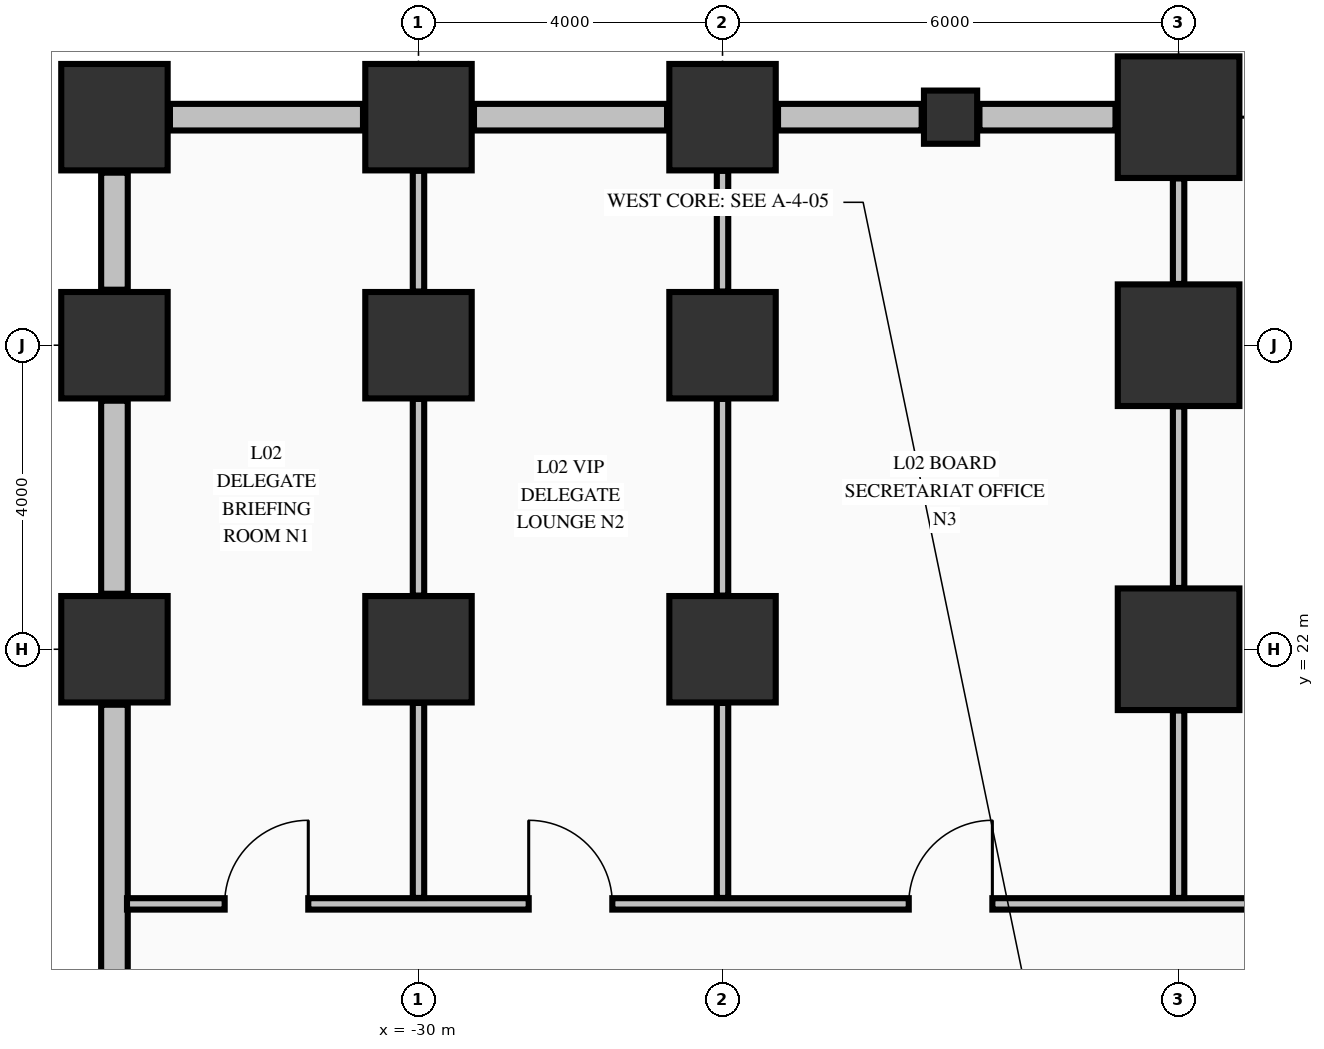
"""IFC4 building model, lengths in metres.
Left out: names, types, materials, properties, quantities, classifications, styles, units other than length and angle.
Written with IfcOpenShell. Run it as: python <this file> out.ifc"""

import sys

from ifc_helpers import new_model, si_unit, direction, frame, frame_2d, origin, origin_2d, place, context, subcontext, project, spatial, rectangle, extrude, element, fill, save


model = new_model("IFC4")
c1 = context("Model", 3, precision=1e-05, world=origin(), true_north=direction((0.0, 1.0)))
c2 = subcontext(c1, "Body", "Model", "MODEL_VIEW")
j1 = project(units=[si_unit("LENGTHUNIT", "METRE"), si_unit("PLANEANGLEUNIT", "RADIAN")], contexts=[c1])
p1 = place(None, origin())
s1 = spatial("IfcSite", under=j1, at=p1, CompositionType="ELEMENT")
p2 = place(p1, origin())
s2 = spatial("IfcBuilding", under=s1, at=p2, CompositionType="ELEMENT")
p3 = place(p2, frame((0.0, 0.0, 10.88)))
s3 = spatial("IfcBuildingStorey", under=s2, at=p3, CompositionType="ELEMENT", Elevation=10.88)
for number, where, z_axis, x_axis in (
    (1, (-34.0, 22.0, 0.0), (0.0, 0.0, 1.0), (1.0, 0.0, 0.0)),
    (2, (-34.0, 26.0, 0.0), (0.0, 0.0, 1.0), (1.0, 0.0, 0.0)),
    (3, (-34.0, 29.0, 0.0), (0.0, 0.0, 1.0), (1.0, 0.0, 0.0)),
    (4, (-30.0, 22.0, 0.0), (0.0, 0.0, 1.0), (1.0, 0.0, 0.0)),
    (5, (-30.0, 26.0, 0.0), (0.0, 0.0, 1.0), (1.0, 0.0, 0.0)),
    (6, (-30.0, 29.0, 0.0), (0.0, 0.0, 1.0), (1.0, 0.0, 0.0)),
    (7, (-26.0, 22.0, 0.0), (0.0, 0.0, 1.0), (1.0, 0.0, 0.0)),
    (8, (-26.0, 26.0, 0.0), (0.0, 0.0, 1.0), (1.0, 0.0, 0.0)),
    (9, (-26.0, 29.0, 0.0), (0.0, 0.0, 1.0), (1.0, 0.0, 0.0)),
):
    element("IfcColumn", number, at=place(p3, frame(where, z_axis=z_axis, x_axis=x_axis)), inside=s3, PredefinedType="COLUMN", context=c2, shape_type="SweptSolid", body=[
        extrude(rectangle(XDim=1.4, YDim=1.4, at=origin_2d()), origin(), (0.0, 0.0, 1.0), 5.09),
    ])
for number, where, z_axis, x_axis in (
    (10, (-20.0, 22.0, 0.0), (0.0, 0.0, 1.0), (1.0, 0.0, 0.0)),
    (11, (-20.0, 26.0, 0.0), (0.0, 0.0, 1.0), (1.0, 0.0, 0.0)),
    (12, (-20.0, 29.0, 0.0), (0.0, 0.0, 1.0), (1.0, 0.0, 0.0)),
):
    element("IfcColumn", number, at=place(p3, frame(where, z_axis=z_axis, x_axis=x_axis)), inside=s3, PredefinedType="COLUMN", context=c2, shape_type="SweptSolid", body=[
        extrude(rectangle(XDim=1.6, YDim=1.6, at=origin_2d()), origin(), (0.0, 0.0, 1.0), 5.09),
    ])
p4 = place(p3, frame((-23.0, 29.0, 0.0), z_axis=(0.0, 0.0, 1.0), x_axis=(1.0, 0.0, 0.0)))
e13 = element("IfcColumn", 13, at=p4, inside=s3, PredefinedType="PILASTER", context=c2, shape_type="SweptSolid", body=[
    extrude(rectangle(XDim=0.7, YDim=0.7, at=origin_2d()), origin(), (0.0, 0.0, 1.0), 5.09),
])
for number, where, z_axis, x_axis in (
    (14, (-30.73, 29.0, 0.0), (0.0, 0.0, 1.0), (-1.0, 0.0, 0.0)),
    (15, (-26.73, 29.0, 0.0), (0.0, 0.0, 1.0), (-1.0, 0.0, 0.0)),
):
    element("IfcWall", number, at=place(p3, frame(where, z_axis=z_axis, x_axis=x_axis)), inside=s3, PredefinedType="STANDARD", context=c2, shape_type="SweptSolid", body=[
        extrude(rectangle(XDim=2.54, YDim=0.35, at=frame_2d((1.27, 0.0))), origin(), (0.0, 0.0, 1.0), 4.482),
    ])
p5 = place(p3, frame((-23.38, 29.0, 0.0), z_axis=(0.0, 0.0, 1.0), x_axis=(-1.0, 0.0, 0.0)))
e16 = element("IfcWall", 16, at=p5, inside=s3, PredefinedType="STANDARD", context=c2, shape_type="SweptSolid", body=[
    extrude(rectangle(XDim=1.89, YDim=0.35, at=frame_2d((0.945, 0.0))), origin(), (0.0, 0.0, 1.0), 4.482),
])
p6 = place(p3, frame((-20.83, 29.0, 0.0), z_axis=(0.0, 0.0, 1.0), x_axis=(-1.0, 0.0, 0.0)))
e17 = element("IfcWall", 17, at=p6, inside=s3, PredefinedType="STANDARD", context=c2, shape_type="SweptSolid", body=[
    extrude(rectangle(XDim=1.79, YDim=0.35, at=frame_2d((0.895, 0.0))), origin(), (0.0, 0.0, 1.0), 4.482),
])
p7 = place(p3, frame((-34.0, 16.73, 0.0), z_axis=(0.0, 0.0, 1.0), x_axis=(0.0, 1.0, 0.0)))
e18 = element("IfcWall", 18, at=p7, inside=s3, PredefinedType="STANDARD", context=c2, shape_type="SweptSolid", body=[
    extrude(rectangle(XDim=4.54, YDim=0.35, at=frame_2d((2.27, 0.0))), origin(), (0.0, 0.0, 1.0), 4.482),
])
p8 = place(p3, frame((-34.0, 22.73, 0.0), z_axis=(0.0, 0.0, 1.0), x_axis=(0.0, 1.0, 0.0)))
e19 = element("IfcWall", 19, at=p8, inside=s3, PredefinedType="STANDARD", context=c2, shape_type="SweptSolid", body=[
    extrude(rectangle(XDim=2.54, YDim=0.35, at=frame_2d((1.27, 0.0))), origin(), (0.0, 0.0, 1.0), 4.482),
])
p9 = place(p3, frame((-34.0, 26.73, 0.0), z_axis=(0.0, 0.0, 1.0), x_axis=(0.0, 1.0, 0.0)))
e20 = element("IfcWall", 20, at=p9, inside=s3, PredefinedType="STANDARD", context=c2, shape_type="SweptSolid", body=[
    extrude(rectangle(XDim=1.54, YDim=0.35, at=frame_2d((0.77, 0.0))), origin(), (0.0, 0.0, 1.0), 4.482),
])
p10 = place(p3, frame((-33.835, 18.65, 0.0), z_axis=(0.0, 0.0, 1.0), x_axis=(1.0, 0.0, 0.0)))
e21 = element("IfcWall", 21, at=p10, inside=s3, PredefinedType="PARTITIONING", context=c2, shape_type="SweptSolid", body=[
    extrude(rectangle(XDim=63.685, YDim=0.15, at=frame_2d((31.843, 0.0))), origin(), (0.0, 0.0, 1.0), 5.09),
])
p11 = place(p10, frame((1.285, 0.0, 0.0)))
e22 = element("IfcOpeningElement", 22, at=p11, cuts=e21, PredefinedType="OPENING", context=c2, shape_type="SweptSolid", body=[
    extrude(rectangle(XDim=1.1, YDim=2.15, at=frame_2d((0.55, 1.075))), frame((0.0, 0.085, 0.0), z_axis=(0.0, -1.0, 0.0), x_axis=(1.0, 0.0, 0.0)), (0.0, 0.0, 1.0), 0.17),
])
p12 = place(p10, frame((5.285, 0.0, 0.0)))
e23 = element("IfcOpeningElement", 23, at=p12, cuts=e21, PredefinedType="OPENING", context=c2, shape_type="SweptSolid", body=[
    extrude(rectangle(XDim=1.1, YDim=2.15, at=frame_2d((0.55, 1.075))), frame((0.0, 0.085, 0.0), z_axis=(0.0, -1.0, 0.0), x_axis=(1.0, 0.0, 0.0)), (0.0, 0.0, 1.0), 0.17),
])
p13 = place(p10, frame((10.285, 0.0, 0.0)))
e24 = element("IfcOpeningElement", 24, at=p13, cuts=e21, PredefinedType="OPENING", context=c2, shape_type="SweptSolid", body=[
    extrude(rectangle(XDim=1.1, YDim=2.15, at=frame_2d((0.55, 1.075))), frame((0.0, 0.085, 0.0), z_axis=(0.0, -1.0, 0.0), x_axis=(1.0, 0.0, 0.0)), (0.0, 0.0, 1.0), 0.17),
])
p14 = place(p10, frame((15.535, 0.0, 0.0)))
e25 = element("IfcOpeningElement", 25, at=p14, cuts=e21, PredefinedType="OPENING", context=c2, shape_type="SweptSolid", body=[
    extrude(rectangle(XDim=1.1, YDim=2.15, at=frame_2d((0.55, 1.075))), frame((0.0, 0.085, 0.0), z_axis=(0.0, -1.0, 0.0), x_axis=(1.0, 0.0, 0.0)), (0.0, 0.0, 1.0), 0.17),
])
p15 = place(p10, frame((20.035, 0.0, 0.0)))
e26 = element("IfcOpeningElement", 26, at=p15, cuts=e21, PredefinedType="OPENING", context=c2, shape_type="SweptSolid", body=[
    extrude(rectangle(XDim=1.1, YDim=2.15, at=frame_2d((0.55, 1.075))), frame((0.0, 0.085, 0.0), z_axis=(0.0, -1.0, 0.0), x_axis=(1.0, 0.0, 0.0)), (0.0, 0.0, 1.0), 0.17),
])
p16 = place(p10, frame((23.56, 0.0, 0.0)))
e27 = element("IfcOpeningElement", 27, at=p16, cuts=e21, PredefinedType="OPENING", context=c2, shape_type="SweptSolid", body=[
    extrude(rectangle(XDim=0.95, YDim=2.15, at=frame_2d((0.475, 1.075))), frame((0.0, 0.085, 0.0), z_axis=(0.0, -1.0, 0.0), x_axis=(1.0, 0.0, 0.0)), (0.0, 0.0, 1.0), 0.17),
])
p17 = place(p10, frame((28.985, 0.0, 0.0)))
e28 = element("IfcOpeningElement", 28, at=p17, cuts=e21, PredefinedType="OPENING", context=c2, shape_type="SweptSolid", body=[
    extrude(rectangle(XDim=1.1, YDim=2.15, at=frame_2d((0.55, 1.075))), frame((0.0, 0.085, 0.0), z_axis=(0.0, -1.0, 0.0), x_axis=(1.0, 0.0, 0.0)), (0.0, 0.0, 1.0), 0.17),
])
p18 = place(p10, frame((37.585, 0.0, 0.0)))
e29 = element("IfcOpeningElement", 29, at=p18, cuts=e21, PredefinedType="OPENING", context=c2, shape_type="SweptSolid", body=[
    extrude(rectangle(XDim=1.1, YDim=2.15, at=frame_2d((0.55, 1.075))), frame((0.0, 0.085, 0.0), z_axis=(0.0, -1.0, 0.0), x_axis=(1.0, 0.0, 0.0)), (0.0, 0.0, 1.0), 0.17),
])
p19 = place(p10, frame((43.16, 0.0, 0.0)))
e30 = element("IfcOpeningElement", 30, at=p19, cuts=e21, PredefinedType="OPENING", context=c2, shape_type="SweptSolid", body=[
    extrude(rectangle(XDim=0.95, YDim=2.15, at=frame_2d((0.475, 1.075))), frame((0.0, 0.085, 0.0), z_axis=(0.0, -1.0, 0.0), x_axis=(1.0, 0.0, 0.0)), (0.0, 0.0, 1.0), 0.17),
])
p20 = place(p10, frame((61.31, 0.0, 0.0)))
e31 = element("IfcOpeningElement", 31, at=p20, cuts=e21, PredefinedType="OPENING", context=c2, shape_type="SweptSolid", body=[
    extrude(rectangle(XDim=0.95, YDim=2.15, at=frame_2d((0.475, 1.075))), frame((0.0, 0.085, 0.0), z_axis=(0.0, -1.0, 0.0), x_axis=(1.0, 0.0, 0.0)), (0.0, 0.0, 1.0), 0.17),
])
p21 = place(p10, frame((47.56, 0.0, 0.0)))
e32 = element("IfcOpeningElement", 32, at=p21, cuts=e21, PredefinedType="OPENING", context=c2, shape_type="SweptSolid", body=[
    extrude(rectangle(XDim=0.95, YDim=2.15, at=frame_2d((0.475, 1.075))), frame((0.0, 0.085, 0.0), z_axis=(0.0, -1.0, 0.0), x_axis=(1.0, 0.0, 0.0)), (0.0, 0.0, 1.0), 0.17),
])
p22 = place(p10, frame((51.31, 0.0, 0.0)))
e33 = element("IfcOpeningElement", 33, at=p22, cuts=e21, PredefinedType="OPENING", context=c2, shape_type="SweptSolid", body=[
    extrude(rectangle(XDim=1.05, YDim=2.15, at=frame_2d((0.525, 1.075))), frame((0.0, 0.085, 0.0), z_axis=(0.0, -1.0, 0.0), x_axis=(1.0, 0.0, 0.0)), (0.0, 0.0, 1.0), 0.17),
])
p23 = place(p10, frame((56.06, 0.0, 0.0)))
e34 = element("IfcOpeningElement", 34, at=p23, cuts=e21, PredefinedType="OPENING", context=c2, shape_type="SweptSolid", body=[
    extrude(rectangle(XDim=0.95, YDim=2.15, at=frame_2d((0.475, 1.075))), frame((0.0, 0.085, 0.0), z_axis=(0.0, -1.0, 0.0), x_axis=(1.0, 0.0, 0.0)), (0.0, 0.0, 1.0), 0.17),
])
p24 = place(p10, frame((58.535, 0.0, 0.0)))
e35 = element("IfcOpeningElement", 35, at=p24, cuts=e21, PredefinedType="OPENING", context=c2, shape_type="SweptSolid", body=[
    extrude(rectangle(XDim=0.9, YDim=2.15, at=frame_2d((0.45, 1.075))), frame((0.0, 0.085, 0.0), z_axis=(0.0, -1.0, 0.0), x_axis=(1.0, 0.0, 0.0)), (0.0, 0.0, 1.0), 0.17),
])
p25 = place(p3, frame((-30.0, 18.728, 0.0), z_axis=(0.0, 0.0, 1.0), x_axis=(0.0, 1.0, 0.0)))
e36 = element("IfcWall", 36, at=p25, inside=s3, PredefinedType="PARTITIONING", context=c2, shape_type="SweptSolid", body=[
    extrude(rectangle(XDim=2.566, YDim=0.15, at=frame_2d((1.283, 0.0))), origin(), (0.0, 0.0, 1.0), 4.132),
])
p26 = place(p3, frame((-30.0, 22.706, 0.0), z_axis=(0.0, 0.0, 1.0), x_axis=(0.0, 1.0, 0.0)))
e37 = element("IfcWall", 37, at=p26, inside=s3, PredefinedType="PARTITIONING", context=c2, shape_type="SweptSolid", body=[
    extrude(rectangle(XDim=2.588, YDim=0.15, at=frame_2d((1.294, 0.0))), origin(), (0.0, 0.0, 1.0), 4.132),
])
p27 = place(p3, frame((-30.0, 26.706, 0.0), z_axis=(0.0, 0.0, 1.0), x_axis=(0.0, 1.0, 0.0)))
e38 = element("IfcWall", 38, at=p27, inside=s3, PredefinedType="PARTITIONING", context=c2, shape_type="SweptSolid", body=[
    extrude(rectangle(XDim=1.588, YDim=0.15, at=frame_2d((0.794, 0.0))), origin(), (0.0, 0.0, 1.0), 4.132),
])
p28 = place(p3, frame((-26.0, 18.728, 0.0), z_axis=(0.0, 0.0, 1.0), x_axis=(0.0, 1.0, 0.0)))
e39 = element("IfcWall", 39, at=p28, inside=s3, PredefinedType="PARTITIONING", context=c2, shape_type="SweptSolid", body=[
    extrude(rectangle(XDim=2.566, YDim=0.15, at=frame_2d((1.283, 0.0))), origin(), (0.0, 0.0, 1.0), 4.132),
])
p29 = place(p3, frame((-26.0, 22.706, 0.0), z_axis=(0.0, 0.0, 1.0), x_axis=(0.0, 1.0, 0.0)))
e40 = element("IfcWall", 40, at=p29, inside=s3, PredefinedType="PARTITIONING", context=c2, shape_type="SweptSolid", body=[
    extrude(rectangle(XDim=2.588, YDim=0.15, at=frame_2d((1.294, 0.0))), origin(), (0.0, 0.0, 1.0), 4.132),
])
p30 = place(p3, frame((-26.0, 26.706, 0.0), z_axis=(0.0, 0.0, 1.0), x_axis=(0.0, 1.0, 0.0)))
e41 = element("IfcWall", 41, at=p30, inside=s3, PredefinedType="PARTITIONING", context=c2, shape_type="SweptSolid", body=[
    extrude(rectangle(XDim=1.588, YDim=0.15, at=frame_2d((0.794, 0.0))), origin(), (0.0, 0.0, 1.0), 4.132),
])
p31 = place(p3, frame((-20.0, 18.728, 0.0), z_axis=(0.0, 0.0, 1.0), x_axis=(0.0, 1.0, 0.0)))
e42 = element("IfcWall", 42, at=p31, inside=s3, PredefinedType="PARTITIONING", context=c2, shape_type="SweptSolid", body=[
    extrude(rectangle(XDim=2.466, YDim=0.15, at=frame_2d((1.233, 0.0))), origin(), (0.0, 0.0, 1.0), 4.132),
])
p32 = place(p3, frame((-20.0, 22.806, 0.0), z_axis=(0.0, 0.0, 1.0), x_axis=(0.0, 1.0, 0.0)))
e43 = element("IfcWall", 43, at=p32, inside=s3, PredefinedType="PARTITIONING", context=c2, shape_type="SweptSolid", body=[
    extrude(rectangle(XDim=2.388, YDim=0.15, at=frame_2d((1.194, 0.0))), origin(), (0.0, 0.0, 1.0), 4.132),
])
p33 = place(p3, frame((-20.0, 26.806, 0.0), z_axis=(0.0, 0.0, 1.0), x_axis=(0.0, 1.0, 0.0)))
e44 = element("IfcWall", 44, at=p33, inside=s3, PredefinedType="PARTITIONING", context=c2, shape_type="SweptSolid", body=[
    extrude(rectangle(XDim=1.388, YDim=0.15, at=frame_2d((0.694, 0.0))), origin(), (0.0, 0.0, 1.0), 4.132),
])
p34 = place(p11, origin())
e45 = element("IfcDoor", 45, at=p34, inside=s3, OperationType="SINGLE_SWING_RIGHT", PredefinedType="DOOR", context=c2, shape_type="SweptSolid", body=[
    extrude(rectangle(XDim=1.1, YDim=2.15, at=frame_2d((0.55, 1.075))), frame((0.0, 0.025, 0.0), z_axis=(0.0, -1.0, 0.0), x_axis=(1.0, 0.0, 0.0)), (0.0, 0.0, 1.0), 0.05),
])
fill(e22, e45)
p35 = place(p12, origin())
e46 = element("IfcDoor", 46, at=p35, inside=s3, OperationType="SINGLE_SWING_LEFT", PredefinedType="DOOR", context=c2, shape_type="SweptSolid", body=[
    extrude(rectangle(XDim=1.1, YDim=2.15, at=frame_2d((0.55, 1.075))), frame((0.0, 0.025, 0.0), z_axis=(0.0, -1.0, 0.0), x_axis=(1.0, 0.0, 0.0)), (0.0, 0.0, 1.0), 0.05),
])
fill(e23, e46)
p36 = place(p13, origin())
e47 = element("IfcDoor", 47, at=p36, inside=s3, OperationType="SINGLE_SWING_RIGHT", PredefinedType="DOOR", context=c2, shape_type="SweptSolid", body=[
    extrude(rectangle(XDim=1.1, YDim=2.15, at=frame_2d((0.55, 1.075))), frame((0.0, 0.025, 0.0), z_axis=(0.0, -1.0, 0.0), x_axis=(1.0, 0.0, 0.0)), (0.0, 0.0, 1.0), 0.05),
])
fill(e24, e47)
save(model, sys.argv[1])
